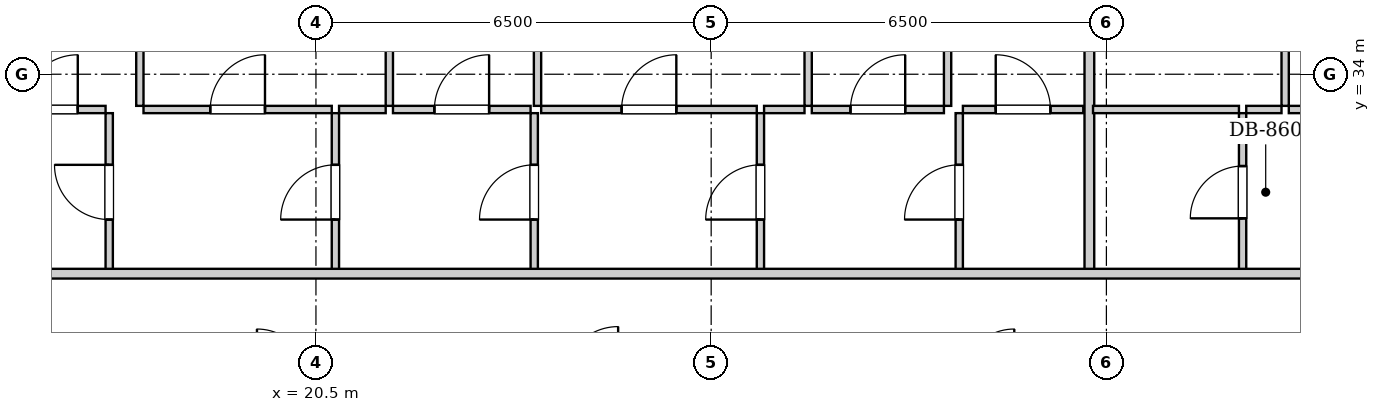
"""IFC4 building model, lengths in metres.
Left out: names, types, materials, properties, quantities, classifications, styles, units other than length and angle.
Written with IfcOpenShell. Run it as: python <this file> out.ifc"""

import sys

from ifc_helpers import new_model, si_unit, direction, frame, frame_2d, origin, place, context, subcontext, project, spatial, rectangle, extrude, element, fill, save


model = new_model("IFC4")
c1 = context("Model", 3, precision=1e-05, world=origin(), true_north=direction((0.0, 1.0)))
c2 = subcontext(c1, "Body", "Model", "MODEL_VIEW")
j1 = project(units=[si_unit("LENGTHUNIT", "METRE"), si_unit("PLANEANGLEUNIT", "RADIAN")], contexts=[c1])
p1 = place(None, origin())
s1 = spatial("IfcSite", under=j1, at=p1, CompositionType="ELEMENT")
p2 = place(p1, origin())
s2 = spatial("IfcBuilding", under=s1, at=p2, CompositionType="ELEMENT")
p3 = place(p2, frame((0.0, 0.0, 25.8)))
s3 = spatial("IfcBuildingStorey", under=s2, at=p3, CompositionType="ELEMENT", Elevation=25.8)
p4 = place(p3, frame((17.1, 30.76, 0.0), z_axis=(0.0, 0.0, 1.0), x_axis=(0.0, 1.0, 0.0)))
e1 = element("IfcWall", 1, at=p4, inside=s3, PredefinedType="PARTITIONING", context=c2, shape_type="SweptSolid", body=[
    extrude(rectangle(XDim=2.6, YDim=0.12, at=frame_2d((1.3, 0.0))), origin(), (0.0, 0.0, 1.0), 2.94),
])
p5 = place(p4, frame((0.85, 0.0, 0.0)))
e2 = element("IfcOpeningElement", 2, at=p5, cuts=e1, PredefinedType="OPENING", context=c2, shape_type="SweptSolid", body=[
    extrude(rectangle(XDim=0.9, YDim=2.05, at=frame_2d((0.45, 1.025))), frame((0.0, 0.07, 0.0), z_axis=(0.0, -1.0, 0.0), x_axis=(1.0, 0.0, 0.0)), (0.0, 0.0, 1.0), 0.14),
])
p6 = place(p3, frame((15.227, 33.42, 0.0), z_axis=(0.0, 0.0, 1.0), x_axis=(1.0, 0.0, 0.0)))
e3 = element("IfcWall", 3, at=p6, inside=s3, PredefinedType="PARTITIONING", context=c2, shape_type="SweptSolid", body=[
    extrude(rectangle(XDim=1.813, YDim=0.12, at=frame_2d((0.906, 0.0))), origin(), (0.0, 0.0, 1.0), 2.94),
])
p7 = place(p6, frame((0.456, 0.0, 0.0)))
e4 = element("IfcOpeningElement", 4, at=p7, cuts=e3, PredefinedType="OPENING", context=c2, shape_type="SweptSolid", body=[
    extrude(rectangle(XDim=0.9, YDim=2.05, at=frame_2d((0.45, 1.025))), frame((0.0, 0.07, 0.0), z_axis=(0.0, -1.0, 0.0), x_axis=(1.0, 0.0, 0.0)), (0.0, 0.0, 1.0), 0.14),
])
p8 = place(p3, frame((20.82, 30.76, 0.0), z_axis=(0.0, 0.0, 1.0), x_axis=(0.0, 1.0, 0.0)))
e5 = element("IfcWall", 5, at=p8, inside=s3, PredefinedType="PARTITIONING", context=c2, shape_type="SweptSolid", body=[
    extrude(rectangle(XDim=2.6, YDim=0.12, at=frame_2d((1.3, 0.0))), origin(), (0.0, 0.0, 1.0), 2.94),
])
p9 = place(p8, frame((0.85, 0.0, 0.0)))
e6 = element("IfcOpeningElement", 6, at=p9, cuts=e5, PredefinedType="OPENING", context=c2, shape_type="SweptSolid", body=[
    extrude(rectangle(XDim=0.9, YDim=2.05, at=frame_2d((0.45, 1.025))), frame((0.0, 0.07, 0.0), z_axis=(0.0, -1.0, 0.0), x_axis=(1.0, 0.0, 0.0)), (0.0, 0.0, 1.0), 0.14),
])
p10 = place(p3, frame((17.664, 33.42, 0.0), z_axis=(0.0, 0.0, 1.0), x_axis=(1.0, 0.0, 0.0)))
e7 = element("IfcWall", 7, at=p10, inside=s3, PredefinedType="PARTITIONING", context=c2, shape_type="SweptSolid", body=[
    extrude(rectangle(XDim=3.096, YDim=0.12, at=frame_2d((1.548, 0.0))), origin(), (0.0, 0.0, 1.0), 2.94),
])
p11 = place(p10, frame((1.098, 0.0, 0.0)))
e8 = element("IfcOpeningElement", 8, at=p11, cuts=e7, PredefinedType="OPENING", context=c2, shape_type="SweptSolid", body=[
    extrude(rectangle(XDim=0.9, YDim=2.05, at=frame_2d((0.45, 1.025))), frame((0.0, 0.07, 0.0), z_axis=(0.0, -1.0, 0.0), x_axis=(1.0, 0.0, 0.0)), (0.0, 0.0, 1.0), 0.14),
])
p12 = place(p3, frame((24.09, 30.76, 0.0), z_axis=(0.0, 0.0, 1.0), x_axis=(0.0, 1.0, 0.0)))
e9 = element("IfcWall", 9, at=p12, inside=s3, PredefinedType="PARTITIONING", context=c2, shape_type="SweptSolid", body=[
    extrude(rectangle(XDim=2.6, YDim=0.12, at=frame_2d((1.3, 0.0))), origin(), (0.0, 0.0, 1.0), 2.94),
])
p13 = place(p12, frame((0.85, 0.0, 0.0)))
e10 = element("IfcOpeningElement", 10, at=p13, cuts=e9, PredefinedType="OPENING", context=c2, shape_type="SweptSolid", body=[
    extrude(rectangle(XDim=0.9, YDim=2.05, at=frame_2d((0.45, 1.025))), frame((0.0, 0.07, 0.0), z_axis=(0.0, -1.0, 0.0), x_axis=(1.0, 0.0, 0.0)), (0.0, 0.0, 1.0), 0.14),
])
p14 = place(p3, frame((20.88, 33.42, 0.0), z_axis=(0.0, 0.0, 1.0), x_axis=(1.0, 0.0, 0.0)))
e11 = element("IfcWall", 11, at=p14, inside=s3, PredefinedType="PARTITIONING", context=c2, shape_type="SweptSolid", body=[
    extrude(rectangle(XDim=0.767, YDim=0.12, at=frame_2d((0.384, 0.0))), origin(), (0.0, 0.0, 1.0), 2.94),
])
p15 = place(p3, frame((21.767, 33.42, 0.0), z_axis=(0.0, 0.0, 1.0), x_axis=(1.0, 0.0, 0.0)))
e12 = element("IfcWall", 12, at=p15, inside=s3, PredefinedType="PARTITIONING", context=c2, shape_type="SweptSolid", body=[
    extrude(rectangle(XDim=2.263, YDim=0.12, at=frame_2d((1.131, 0.0))), origin(), (0.0, 0.0, 1.0), 2.94),
])
p16 = place(p15, frame((0.681, 0.0, 0.0)))
e13 = element("IfcOpeningElement", 13, at=p16, cuts=e12, PredefinedType="OPENING", context=c2, shape_type="SweptSolid", body=[
    extrude(rectangle(XDim=0.9, YDim=2.05, at=frame_2d((0.45, 1.025))), frame((0.0, 0.07, 0.0), z_axis=(0.0, -1.0, 0.0), x_axis=(1.0, 0.0, 0.0)), (0.0, 0.0, 1.0), 0.14),
])
p17 = place(p3, frame((27.81, 30.76, 0.0), z_axis=(0.0, 0.0, 1.0), x_axis=(0.0, 1.0, 0.0)))
e14 = element("IfcWall", 14, at=p17, inside=s3, PredefinedType="PARTITIONING", context=c2, shape_type="SweptSolid", body=[
    extrude(rectangle(XDim=2.6, YDim=0.12, at=frame_2d((1.3, 0.0))), origin(), (0.0, 0.0, 1.0), 2.94),
])
p18 = place(p17, frame((0.85, 0.0, 0.0)))
e15 = element("IfcOpeningElement", 15, at=p18, cuts=e14, PredefinedType="OPENING", context=c2, shape_type="SweptSolid", body=[
    extrude(rectangle(XDim=0.9, YDim=2.05, at=frame_2d((0.45, 1.025))), frame((0.0, 0.07, 0.0), z_axis=(0.0, -1.0, 0.0), x_axis=(1.0, 0.0, 0.0)), (0.0, 0.0, 1.0), 0.14),
])
p19 = place(p3, frame((24.204, 33.42, 0.0), z_axis=(0.0, 0.0, 1.0), x_axis=(1.0, 0.0, 0.0)))
e16 = element("IfcWall", 16, at=p19, inside=s3, PredefinedType="PARTITIONING", context=c2, shape_type="SweptSolid", body=[
    extrude(rectangle(XDim=3.546, YDim=0.12, at=frame_2d((1.773, 0.0))), origin(), (0.0, 0.0, 1.0), 2.94),
])
p20 = place(p19, frame((1.323, 0.0, 0.0)))
e17 = element("IfcOpeningElement", 17, at=p20, cuts=e16, PredefinedType="OPENING", context=c2, shape_type="SweptSolid", body=[
    extrude(rectangle(XDim=0.9, YDim=2.05, at=frame_2d((0.45, 1.025))), frame((0.0, 0.07, 0.0), z_axis=(0.0, -1.0, 0.0), x_axis=(1.0, 0.0, 0.0)), (0.0, 0.0, 1.0), 0.14),
])
p21 = place(p3, frame((31.08, 30.76, 0.0), z_axis=(0.0, 0.0, 1.0), x_axis=(0.0, 1.0, 0.0)))
e18 = element("IfcWall", 18, at=p21, inside=s3, PredefinedType="PARTITIONING", context=c2, shape_type="SweptSolid", body=[
    extrude(rectangle(XDim=2.6, YDim=0.12, at=frame_2d((1.3, 0.0))), origin(), (0.0, 0.0, 1.0), 2.94),
])
p22 = place(p21, frame((0.85, 0.0, 0.0)))
e19 = element("IfcOpeningElement", 19, at=p22, cuts=e18, PredefinedType="OPENING", context=c2, shape_type="SweptSolid", body=[
    extrude(rectangle(XDim=0.9, YDim=2.05, at=frame_2d((0.45, 1.025))), frame((0.0, 0.07, 0.0), z_axis=(0.0, -1.0, 0.0), x_axis=(1.0, 0.0, 0.0)), (0.0, 0.0, 1.0), 0.14),
])
p23 = place(p3, frame((27.87, 33.42, 0.0), z_axis=(0.0, 0.0, 1.0), x_axis=(1.0, 0.0, 0.0)))
e20 = element("IfcWall", 20, at=p23, inside=s3, PredefinedType="PARTITIONING", context=c2, shape_type="SweptSolid", body=[
    extrude(rectangle(XDim=0.665, YDim=0.12, at=frame_2d((0.333, 0.0))), origin(), (0.0, 0.0, 1.0), 2.94),
])
p24 = place(p3, frame((28.655, 33.42, 0.0), z_axis=(0.0, 0.0, 1.0), x_axis=(1.0, 0.0, 0.0)))
e21 = element("IfcWall", 21, at=p24, inside=s3, PredefinedType="PARTITIONING", context=c2, shape_type="SweptSolid", body=[
    extrude(rectangle(XDim=2.173, YDim=0.12, at=frame_2d((1.086, 0.0))), origin(), (0.0, 0.0, 1.0), 2.94),
])
p25 = place(p24, frame((0.636, 0.0, 0.0)))
e22 = element("IfcOpeningElement", 22, at=p25, cuts=e21, PredefinedType="OPENING", context=c2, shape_type="SweptSolid", body=[
    extrude(rectangle(XDim=0.9, YDim=2.05, at=frame_2d((0.45, 1.025))), frame((0.0, 0.07, 0.0), z_axis=(0.0, -1.0, 0.0), x_axis=(1.0, 0.0, 0.0)), (0.0, 0.0, 1.0), 0.14),
])
p26 = place(p3, frame((31.14, 33.42, 0.0), z_axis=(0.0, 0.0, 1.0), x_axis=(1.0, 0.0, 0.0)))
e23 = element("IfcWall", 23, at=p26, inside=s3, PredefinedType="PARTITIONING", context=c2, shape_type="SweptSolid", body=[
    extrude(rectangle(XDim=1.98, YDim=0.12, at=frame_2d((0.99, 0.0))), origin(), (0.0, 0.0, 1.0), 2.94),
])
p27 = place(p26, frame((0.54, 0.0, 0.0)))
e24 = element("IfcOpeningElement", 24, at=p27, cuts=e23, PredefinedType="OPENING", context=c2, shape_type="SweptSolid", body=[
    extrude(rectangle(XDim=0.9, YDim=2.05, at=frame_2d((0.45, 1.025))), frame((0.0, 0.07, 0.0), z_axis=(0.0, -1.0, 0.0), x_axis=(1.0, 0.0, 0.0)), (0.0, 0.0, 1.0), 0.14),
])
p28 = place(p3, frame((17.604, 33.48, 0.0), z_axis=(0.0, 0.0, 1.0), x_axis=(0.0, 1.0, 0.0)))
e25 = element("IfcWall", 25, at=p28, inside=s3, PredefinedType="PARTITIONING", context=c2, shape_type="SweptSolid", body=[
    extrude(rectangle(XDim=13.84, YDim=0.12, at=frame_2d((6.92, 0.0))), origin(), (0.0, 0.0, 1.0), 2.94),
])
p29 = place(p28, frame((6.455, 0.0, 0.0)))
e26 = element("IfcOpeningElement", 26, at=p29, cuts=e25, PredefinedType="OPENING", context=c2, shape_type="SweptSolid", body=[
    extrude(rectangle(XDim=0.9, YDim=2.05, at=frame_2d((0.45, 1.025))), frame((0.0, 0.07, 0.0), z_axis=(0.0, -1.0, 0.0), x_axis=(1.0, 0.0, 0.0)), (0.0, 0.0, 1.0), 0.14),
])
p30 = place(p3, frame((21.707, 33.48, 0.0), z_axis=(0.0, 0.0, 1.0), x_axis=(0.0, 1.0, 0.0)))
e27 = element("IfcWall", 27, at=p30, inside=s3, PredefinedType="PARTITIONING", context=c2, shape_type="SweptSolid", body=[
    extrude(rectangle(XDim=13.84, YDim=0.12, at=frame_2d((6.92, 0.0))), origin(), (0.0, 0.0, 1.0), 2.94),
])
p31 = place(p30, frame((6.455, 0.0, 0.0)))
e28 = element("IfcOpeningElement", 28, at=p31, cuts=e27, PredefinedType="OPENING", context=c2, shape_type="SweptSolid", body=[
    extrude(rectangle(XDim=0.9, YDim=2.05, at=frame_2d((0.45, 1.025))), frame((0.0, 0.07, 0.0), z_axis=(0.0, -1.0, 0.0), x_axis=(1.0, 0.0, 0.0)), (0.0, 0.0, 1.0), 0.14),
])
p32 = place(p3, frame((24.144, 33.48, 0.0), z_axis=(0.0, 0.0, 1.0), x_axis=(0.0, 1.0, 0.0)))
e29 = element("IfcWall", 29, at=p32, inside=s3, PredefinedType="PARTITIONING", context=c2, shape_type="SweptSolid", body=[
    extrude(rectangle(XDim=13.84, YDim=0.12, at=frame_2d((6.92, 0.0))), origin(), (0.0, 0.0, 1.0), 2.94),
])
p33 = place(p32, frame((6.455, 0.0, 0.0)))
e30 = element("IfcOpeningElement", 30, at=p33, cuts=e29, PredefinedType="OPENING", context=c2, shape_type="SweptSolid", body=[
    extrude(rectangle(XDim=0.9, YDim=2.05, at=frame_2d((0.45, 1.025))), frame((0.0, 0.07, 0.0), z_axis=(0.0, -1.0, 0.0), x_axis=(1.0, 0.0, 0.0)), (0.0, 0.0, 1.0), 0.14),
])
p34 = place(p3, frame((28.595, 33.48, 0.0), z_axis=(0.0, 0.0, 1.0), x_axis=(0.0, 1.0, 0.0)))
e31 = element("IfcWall", 31, at=p34, inside=s3, PredefinedType="PARTITIONING", context=c2, shape_type="SweptSolid", body=[
    extrude(rectangle(XDim=13.84, YDim=0.12, at=frame_2d((6.92, 0.0))), origin(), (0.0, 0.0, 1.0), 2.94),
])
p35 = place(p34, frame((6.455, 0.0, 0.0)))
e32 = element("IfcOpeningElement", 32, at=p35, cuts=e31, PredefinedType="OPENING", context=c2, shape_type="SweptSolid", body=[
    extrude(rectangle(XDim=0.9, YDim=2.05, at=frame_2d((0.45, 1.025))), frame((0.0, 0.07, 0.0), z_axis=(0.0, -1.0, 0.0), x_axis=(1.0, 0.0, 0.0)), (0.0, 0.0, 1.0), 0.14),
])
p36 = place(p3, frame((30.888, 33.48, 0.0), z_axis=(0.0, 0.0, 1.0), x_axis=(0.0, 1.0, 0.0)))
e33 = element("IfcWall", 33, at=p36, inside=s3, PredefinedType="PARTITIONING", context=c2, shape_type="SweptSolid", body=[
    extrude(rectangle(XDim=13.84, YDim=0.12, at=frame_2d((6.92, 0.0))), origin(), (0.0, 0.0, 1.0), 2.94),
])
p37 = place(p36, frame((6.455, 0.0, 0.0)))
e34 = element("IfcOpeningElement", 34, at=p37, cuts=e33, PredefinedType="OPENING", context=c2, shape_type="SweptSolid", body=[
    extrude(rectangle(XDim=0.9, YDim=2.05, at=frame_2d((0.45, 1.025))), frame((0.0, 0.07, 0.0), z_axis=(0.0, -1.0, 0.0), x_axis=(1.0, 0.0, 0.0)), (0.0, 0.0, 1.0), 0.14),
])
p38 = place(p3, frame((33.22, 30.76, 0.0), z_axis=(0.0, 0.0, 1.0), x_axis=(0.0, 1.0, 0.0)))
e35 = element("IfcWall", 35, at=p38, inside=s3, PredefinedType="PARTITIONING", context=c2, shape_type="SweptSolid", body=[
    extrude(rectangle(XDim=16.56, YDim=0.16, at=frame_2d((8.28, 0.0))), origin(), (0.0, 0.0, 1.0), 2.155),
])
p39 = place(p3, frame((35.74, 30.76, 0.0), z_axis=(0.0, 0.0, 1.0), x_axis=(0.0, 1.0, 0.0)))
e36 = element("IfcWall", 36, at=p39, inside=s3, PredefinedType="PARTITIONING", context=c2, shape_type="SweptSolid", body=[
    extrude(rectangle(XDim=2.6, YDim=0.12, at=frame_2d((1.3, 0.0))), origin(), (0.0, 0.0, 1.0), 2.94),
])
p40 = place(p39, frame((0.87, 0.0, 0.0)))
e37 = element("IfcOpeningElement", 37, at=p40, cuts=e36, PredefinedType="OPENING", context=c2, shape_type="SweptSolid", body=[
    extrude(rectangle(XDim=0.86, YDim=2.05, at=frame_2d((0.43, 1.025))), frame((0.0, 0.07, 0.0), z_axis=(0.0, -1.0, 0.0), x_axis=(1.0, 0.0, 0.0)), (0.0, 0.0, 1.0), 0.14),
])
p41 = place(p3, frame((33.28, 33.42, 0.0), z_axis=(0.0, 0.0, 1.0), x_axis=(1.0, 0.0, 0.0)))
e38 = element("IfcWall", 38, at=p41, inside=s3, PredefinedType="PARTITIONING", context=c2, shape_type="SweptSolid", body=[
    extrude(rectangle(XDim=2.4, YDim=0.12, at=frame_2d((1.2, 0.0))), origin(), (0.0, 0.0, 1.0), 2.94),
])
p42 = place(p3, frame((35.8, 33.42, 0.0), z_axis=(0.0, 0.0, 1.0), x_axis=(1.0, 0.0, 0.0)))
e39 = element("IfcWall", 39, at=p42, inside=s3, PredefinedType="PARTITIONING", context=c2, shape_type="SweptSolid", body=[
    extrude(rectangle(XDim=0.58, YDim=0.12, at=frame_2d((0.29, 0.0))), origin(), (0.0, 0.0, 1.0), 2.94),
])
p43 = place(p3, frame((36.5, 33.42, 0.0), z_axis=(0.0, 0.0, 1.0), x_axis=(1.0, 0.0, 0.0)))
e40 = element("IfcWall", 40, at=p43, inside=s3, PredefinedType="PARTITIONING", context=c2, shape_type="SweptSolid", body=[
    extrude(rectangle(XDim=3.1, YDim=0.12, at=frame_2d((1.55, 0.0))), origin(), (0.0, 0.0, 1.0), 2.94),
])
p44 = place(p43, frame((1.1, 0.0, 0.0)))
e41 = element("IfcOpeningElement", 41, at=p44, cuts=e40, PredefinedType="OPENING", context=c2, shape_type="SweptSolid", body=[
    extrude(rectangle(XDim=0.9, YDim=2.05, at=frame_2d((0.45, 1.025))), frame((0.0, 0.07, 0.0), z_axis=(0.0, -1.0, 0.0), x_axis=(1.0, 0.0, 0.0)), (0.0, 0.0, 1.0), 0.14),
])
p45 = place(p3, frame((36.44, 33.48, 0.0), z_axis=(0.0, 0.0, 1.0), x_axis=(0.0, 1.0, 0.0)))
e42 = element("IfcWall", 42, at=p45, inside=s3, PredefinedType="PARTITIONING", context=c2, shape_type="SweptSolid", body=[
    extrude(rectangle(XDim=13.84, YDim=0.12, at=frame_2d((6.92, 0.0))), origin(), (0.0, 0.0, 1.0), 2.94),
])
p46 = place(p45, frame((6.455, 0.0, 0.0)))
e43 = element("IfcOpeningElement", 43, at=p46, cuts=e42, PredefinedType="OPENING", context=c2, shape_type="SweptSolid", body=[
    extrude(rectangle(XDim=0.9, YDim=2.05, at=frame_2d((0.45, 1.025))), frame((0.0, 0.07, 0.0), z_axis=(0.0, -1.0, 0.0), x_axis=(1.0, 0.0, 0.0)), (0.0, 0.0, 1.0), 0.14),
])
p47 = place(p3, frame((10.05, 30.72, 0.0), z_axis=(0.0, 0.0, 1.0), x_axis=(1.0, 0.0, 0.0)))
e44 = element("IfcWall", 44, at=p47, inside=s3, PredefinedType="PARTITIONING", context=c2, shape_type="SweptSolid", body=[
    extrude(rectangle(XDim=33.9, YDim=0.16, at=frame_2d((16.95, 0.0))), origin(), (0.0, 0.0, 1.0), 2.94),
])
p48 = place(p47, frame((4.295, 0.0, 0.0)))
e45 = element("IfcOpeningElement", 45, at=p48, cuts=e44, PredefinedType="OPENING", context=c2, shape_type="SweptSolid", body=[
    extrude(rectangle(XDim=0.95, YDim=2.1, at=frame_2d((0.475, 1.05))), frame((0.0, 0.09, 0.0), z_axis=(0.0, -1.0, 0.0), x_axis=(1.0, 0.0, 0.0)), (0.0, 0.0, 1.0), 0.18),
])
p49 = place(p47, frame((27.235, 0.0, 0.0)))
e46 = element("IfcOpeningElement", 46, at=p49, cuts=e44, PredefinedType="OPENING", context=c2, shape_type="SweptSolid", body=[
    extrude(rectangle(XDim=0.95, YDim=2.1, at=frame_2d((0.475, 1.05))), frame((0.0, 0.09, 0.0), z_axis=(0.0, -1.0, 0.0), x_axis=(1.0, 0.0, 0.0)), (0.0, 0.0, 1.0), 0.18),
])
p50 = place(p5, origin())
e47 = element("IfcDoor", 47, at=p50, inside=s3, OperationType="SINGLE_SWING_RIGHT", PredefinedType="DOOR", context=c2, shape_type="SweptSolid", body=[
    extrude(rectangle(XDim=0.9, YDim=2.05, at=frame_2d((0.45, 1.025))), frame((0.0, 0.025, 0.0), z_axis=(0.0, -1.0, 0.0), x_axis=(1.0, 0.0, 0.0)), (0.0, 0.0, 1.0), 0.05),
])
fill(e2, e47)
p51 = place(p7, origin())
e48 = element("IfcDoor", 48, at=p51, inside=s3, OperationType="SINGLE_SWING_RIGHT", PredefinedType="DOOR", context=c2, shape_type="SweptSolid", body=[
    extrude(rectangle(XDim=0.9, YDim=2.05, at=frame_2d((0.45, 1.025))), frame((0.0, 0.025, 0.0), z_axis=(0.0, -1.0, 0.0), x_axis=(1.0, 0.0, 0.0)), (0.0, 0.0, 1.0), 0.05),
])
fill(e4, e48)
p52 = place(p9, origin())
e49 = element("IfcDoor", 49, at=p52, inside=s3, OperationType="SINGLE_SWING_LEFT", PredefinedType="DOOR", context=c2, shape_type="SweptSolid", body=[
    extrude(rectangle(XDim=0.9, YDim=2.05, at=frame_2d((0.45, 1.025))), frame((0.0, 0.025, 0.0), z_axis=(0.0, -1.0, 0.0), x_axis=(1.0, 0.0, 0.0)), (0.0, 0.0, 1.0), 0.05),
])
fill(e6, e49)
p53 = place(p11, origin())
e50 = element("IfcDoor", 50, at=p53, inside=s3, OperationType="SINGLE_SWING_RIGHT", PredefinedType="DOOR", context=c2, shape_type="SweptSolid", body=[
    extrude(rectangle(XDim=0.9, YDim=2.05, at=frame_2d((0.45, 1.025))), frame((0.0, 0.025, 0.0), z_axis=(0.0, -1.0, 0.0), x_axis=(1.0, 0.0, 0.0)), (0.0, 0.0, 1.0), 0.05),
])
fill(e8, e50)
p54 = place(p13, origin())
e51 = element("IfcDoor", 51, at=p54, inside=s3, OperationType="SINGLE_SWING_LEFT", PredefinedType="DOOR", context=c2, shape_type="SweptSolid", body=[
    extrude(rectangle(XDim=0.9, YDim=2.05, at=frame_2d((0.45, 1.025))), frame((0.0, 0.025, 0.0), z_axis=(0.0, -1.0, 0.0), x_axis=(1.0, 0.0, 0.0)), (0.0, 0.0, 1.0), 0.05),
])
fill(e10, e51)
p55 = place(p16, origin())
e52 = element("IfcDoor", 52, at=p55, inside=s3, OperationType="SINGLE_SWING_RIGHT", PredefinedType="DOOR", context=c2, shape_type="SweptSolid", body=[
    extrude(rectangle(XDim=0.9, YDim=2.05, at=frame_2d((0.45, 1.025))), frame((0.0, 0.025, 0.0), z_axis=(0.0, -1.0, 0.0), x_axis=(1.0, 0.0, 0.0)), (0.0, 0.0, 1.0), 0.05),
])
fill(e13, e52)
p56 = place(p18, origin())
e53 = element("IfcDoor", 53, at=p56, inside=s3, OperationType="SINGLE_SWING_LEFT", PredefinedType="DOOR", context=c2, shape_type="SweptSolid", body=[
    extrude(rectangle(XDim=0.9, YDim=2.05, at=frame_2d((0.45, 1.025))), frame((0.0, 0.025, 0.0), z_axis=(0.0, -1.0, 0.0), x_axis=(1.0, 0.0, 0.0)), (0.0, 0.0, 1.0), 0.05),
])
fill(e15, e53)
p57 = place(p20, origin())
e54 = element("IfcDoor", 54, at=p57, inside=s3, OperationType="SINGLE_SWING_RIGHT", PredefinedType="DOOR", context=c2, shape_type="SweptSolid", body=[
    extrude(rectangle(XDim=0.9, YDim=2.05, at=frame_2d((0.45, 1.025))), frame((0.0, 0.025, 0.0), z_axis=(0.0, -1.0, 0.0), x_axis=(1.0, 0.0, 0.0)), (0.0, 0.0, 1.0), 0.05),
])
fill(e17, e54)
p58 = place(p22, origin())
e55 = element("IfcDoor", 55, at=p58, inside=s3, OperationType="SINGLE_SWING_LEFT", PredefinedType="DOOR", context=c2, shape_type="SweptSolid", body=[
    extrude(rectangle(XDim=0.9, YDim=2.05, at=frame_2d((0.45, 1.025))), frame((0.0, 0.025, 0.0), z_axis=(0.0, -1.0, 0.0), x_axis=(1.0, 0.0, 0.0)), (0.0, 0.0, 1.0), 0.05),
])
fill(e19, e55)
p59 = place(p25, origin())
e56 = element("IfcDoor", 56, at=p59, inside=s3, OperationType="SINGLE_SWING_RIGHT", PredefinedType="DOOR", context=c2, shape_type="SweptSolid", body=[
    extrude(rectangle(XDim=0.9, YDim=2.05, at=frame_2d((0.45, 1.025))), frame((0.0, 0.025, 0.0), z_axis=(0.0, -1.0, 0.0), x_axis=(1.0, 0.0, 0.0)), (0.0, 0.0, 1.0), 0.05),
])
fill(e22, e56)
p60 = place(p27, origin())
e57 = element("IfcDoor", 57, at=p60, inside=s3, OperationType="SINGLE_SWING_LEFT", PredefinedType="DOOR", context=c2, shape_type="SweptSolid", body=[
    extrude(rectangle(XDim=0.9, YDim=2.05, at=frame_2d((0.45, 1.025))), frame((0.0, 0.025, 0.0), z_axis=(0.0, -1.0, 0.0), x_axis=(1.0, 0.0, 0.0)), (0.0, 0.0, 1.0), 0.05),
])
fill(e24, e57)
p61 = place(p40, origin())
e58 = element("IfcDoor", 58, at=p61, inside=s3, OperationType="SINGLE_SWING_LEFT", PredefinedType="DOOR", context=c2, shape_type="SweptSolid", body=[
    extrude(rectangle(XDim=0.86, YDim=2.05, at=frame_2d((0.43, 1.025))), frame((0.0, 0.025, 0.0), z_axis=(0.0, -1.0, 0.0), x_axis=(1.0, 0.0, 0.0)), (0.0, 0.0, 1.0), 0.05),
])
fill(e37, e58)
save(model, sys.argv[1])
